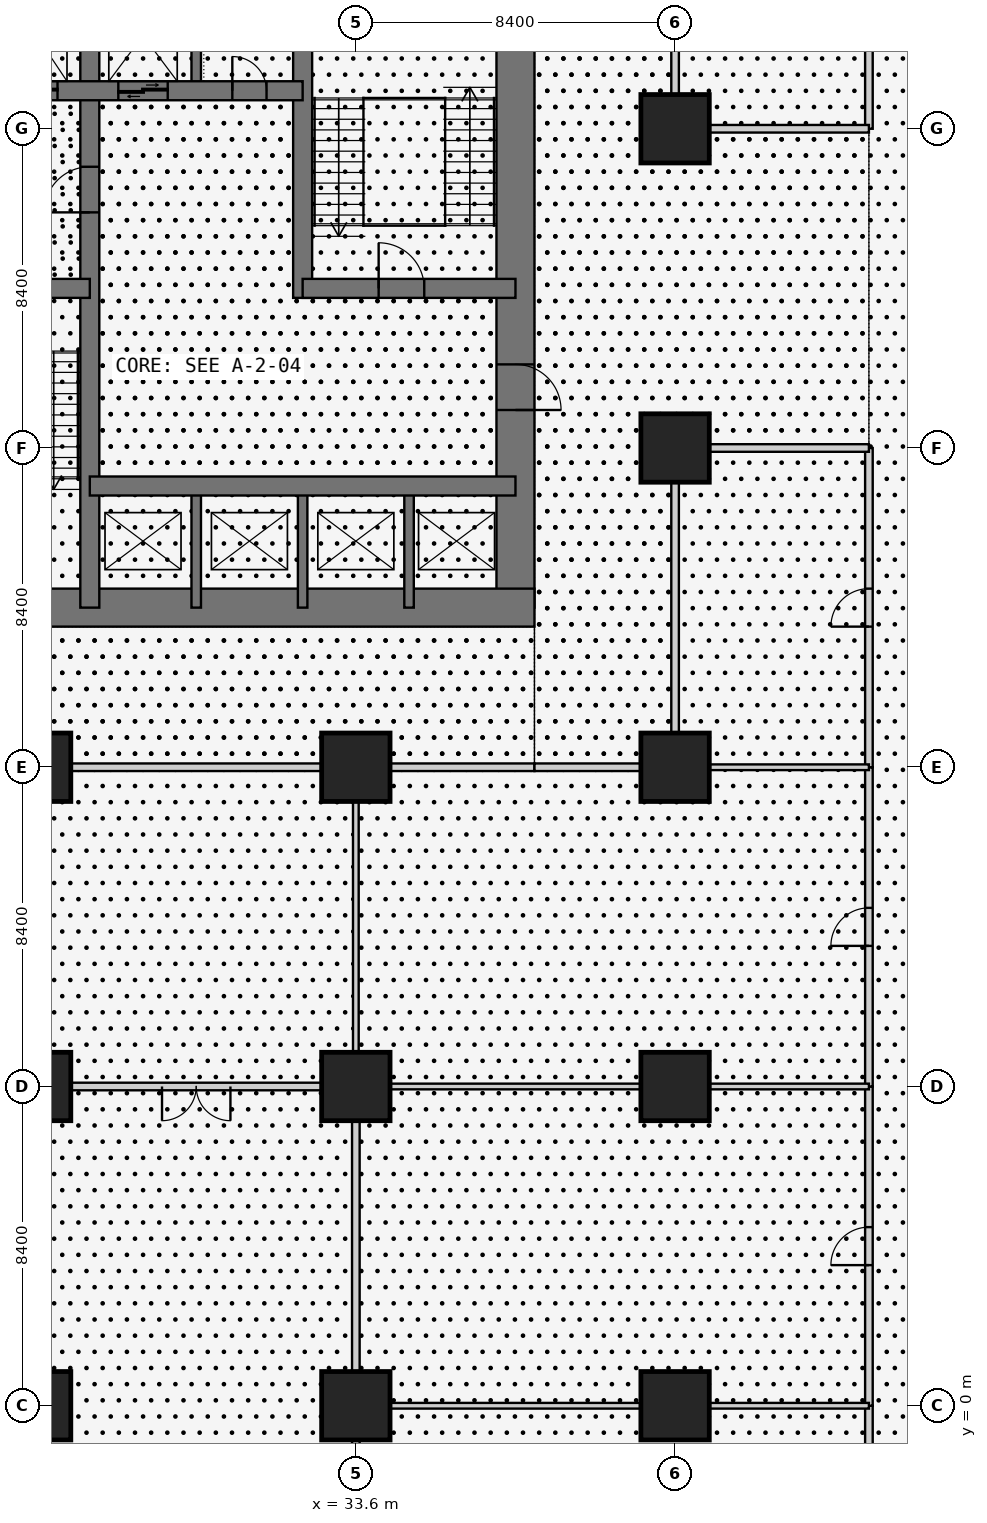
"""IFC4 building model, lengths in metres.
Left out: names, types, materials, properties, quantities, classifications, styles, units other than length and angle.
Written with IfcOpenShell. Run it as: python <this file> out.ifc"""

import sys

from ifc_helpers import new_model, si_unit, direction, frame, frame_2d, origin, origin_2d, place, context, subcontext, project, spatial, rectangle, extrude, element, fill, save


model = new_model("IFC4")
c1 = context("Model", 3, precision=1e-05, world=origin(), true_north=direction((0.0, 1.0)))
c2 = subcontext(c1, "Body", "Model", "MODEL_VIEW")
j1 = project(units=[si_unit("LENGTHUNIT", "METRE"), si_unit("PLANEANGLEUNIT", "RADIAN")], contexts=[c1])
p1 = place(None, origin())
s1 = spatial("IfcSite", under=j1, at=p1, CompositionType="ELEMENT")
p2 = place(p1, origin())
s2 = spatial("IfcBuilding", under=s1, at=p2, CompositionType="ELEMENT")
p3 = place(p2, frame((0.0, 0.0, 6.0)))
s3 = spatial("IfcBuildingStorey", under=s2, at=p3, CompositionType="ELEMENT", Elevation=6.0)
for number, where, z_axis, x_axis in (
    (1, (25.2, 0.0, 0.0), (0.0, 0.0, 1.0), (1.0, 0.0, 0.0)),
    (2, (25.2, 8.4, 0.0), (0.0, 0.0, 1.0), (1.0, 0.0, 0.0)),
    (3, (25.2, 16.8, 0.0), (0.0, 0.0, 1.0), (1.0, 0.0, 0.0)),
    (4, (33.6, 0.0, 0.0), (0.0, 0.0, 1.0), (1.0, 0.0, 0.0)),
    (5, (33.6, 8.4, 0.0), (0.0, 0.0, 1.0), (1.0, 0.0, 0.0)),
    (6, (33.6, 16.8, 0.0), (0.0, 0.0, 1.0), (1.0, 0.0, 0.0)),
    (7, (42.0, 0.0, 0.0), (0.0, 0.0, 1.0), (1.0, 0.0, 0.0)),
    (8, (42.0, 8.4, 0.0), (0.0, 0.0, 1.0), (1.0, 0.0, 0.0)),
    (9, (42.0, 16.8, 0.0), (0.0, 0.0, 1.0), (1.0, 0.0, 0.0)),
    (10, (42.0, 25.2, 0.0), (0.0, 0.0, 1.0), (1.0, 0.0, 0.0)),
    (11, (42.0, 33.6, 0.0), (0.0, 0.0, 1.0), (1.0, 0.0, 0.0)),
):
    element("IfcColumn", number, at=place(p3, frame(where, z_axis=z_axis, x_axis=x_axis)), inside=s3, PredefinedType="COLUMN", context=c2, shape_type="SweptSolid", body=[
        extrude(rectangle(XDim=1.8, YDim=1.8, at=origin_2d()), origin(), (0.0, 0.0, 1.0), 4.5),
    ])
p4 = place(p3, frame((21.0, 21.0, 0.0), z_axis=(0.0, 0.0, 1.0), x_axis=(1.0, 0.0, 0.0)))
e12 = element("IfcWall", 12, at=p4, inside=s3, PredefinedType="SHEAR", context=c2, shape_type="SweptSolid", body=[
    extrude(rectangle(XDim=17.3, YDim=1.0, at=frame_2d((8.65, 0.0))), origin(), (0.0, 0.0, 1.0), 4.5),
])
p5 = place(p3, frame((37.8, 21.0, 0.0), z_axis=(0.0, 0.0, 1.0), x_axis=(0.0, 1.0, 0.0)))
e13 = element("IfcWall", 13, at=p5, inside=s3, PredefinedType="SHEAR", context=c2, shape_type="SweptSolid", body=[
    extrude(rectangle(XDim=17.3, YDim=1.0, at=frame_2d((8.65, 0.0))), origin(), (0.0, 0.0, 1.0), 4.5),
])
p6 = place(p5, frame((5.2, 0.0, 0.0)))
e14 = element("IfcOpeningElement", 14, at=p6, cuts=e13, PredefinedType="OPENING", context=c2, shape_type="SweptSolid", body=[
    extrude(rectangle(XDim=1.2, YDim=2.1, at=frame_2d((0.6, 1.05))), frame((0.0, 0.51, 0.0), z_axis=(0.0, -1.0, 0.0), x_axis=(1.0, 0.0, 0.0)), (0.0, 0.0, 1.0), 1.02),
])
p7 = place(p3, frame((26.6, 21.0, 0.0), z_axis=(0.0, 0.0, 1.0), x_axis=(0.0, 1.0, 0.0)))
e15 = element("IfcWall", 15, at=p7, inside=s3, PredefinedType="SHEAR", context=c2, shape_type="SweptSolid", body=[
    extrude(rectangle(XDim=16.8, YDim=0.5, at=frame_2d((8.4, 0.0))), origin(), (0.0, 0.0, 1.0), 4.5),
])
p8 = place(p7, frame((10.4, 0.0, 0.0)))
e16 = element("IfcOpeningElement", 16, at=p8, cuts=e15, PredefinedType="OPENING", context=c2, shape_type="SweptSolid", body=[
    extrude(rectangle(XDim=1.2, YDim=2.1, at=frame_2d((0.6, 1.05))), frame((0.0, 0.26, 0.0), z_axis=(0.0, -1.0, 0.0), x_axis=(1.0, 0.0, 0.0)), (0.0, 0.0, 1.0), 0.52),
])
p9 = place(p3, frame((21.0, 29.4, 0.0), z_axis=(0.0, 0.0, 1.0), x_axis=(1.0, 0.0, 0.0)))
e17 = element("IfcWall", 17, at=p9, inside=s3, PredefinedType="SHEAR", context=c2, shape_type="SweptSolid", body=[
    extrude(rectangle(XDim=5.6, YDim=0.5, at=frame_2d((2.8, 0.0))), origin(), (0.0, 0.0, 1.0), 4.5),
])
p10 = place(p9, frame((2.3, 0.0, 0.0)))
e18 = element("IfcOpeningElement", 18, at=p10, cuts=e17, PredefinedType="OPENING", context=c2, shape_type="SweptSolid", body=[
    extrude(rectangle(XDim=1.2, YDim=2.1, at=frame_2d((0.6, 1.05))), frame((0.0, 0.26, 0.0), z_axis=(0.0, -1.0, 0.0), x_axis=(1.0, 0.0, 0.0)), (0.0, 0.0, 1.0), 0.52),
])
p11 = place(p3, frame((21.0, 34.6, 0.0), z_axis=(0.0, 0.0, 1.0), x_axis=(1.0, 0.0, 0.0)))
e19 = element("IfcWall", 19, at=p11, inside=s3, PredefinedType="SHEAR", context=c2, shape_type="SweptSolid", body=[
    extrude(rectangle(XDim=11.2, YDim=0.5, at=frame_2d((5.6, 0.0))), origin(), (0.0, 0.0, 1.0), 4.5),
])
p12 = place(p11, frame((9.35, 0.0, 0.0)))
e20 = element("IfcOpeningElement", 20, at=p12, cuts=e19, PredefinedType="OPENING", context=c2, shape_type="SweptSolid", body=[
    extrude(rectangle(XDim=0.9, YDim=2.1, at=frame_2d((0.45, 1.05))), frame((0.0, 0.26, 0.0), z_axis=(0.0, -1.0, 0.0), x_axis=(1.0, 0.0, 0.0)), (0.0, 0.0, 1.0), 0.52),
])
p13 = place(p11, frame((1.0, 0.0, 0.0)))
e21 = element("IfcOpeningElement", 21, at=p13, cuts=e19, PredefinedType="OPENING", context=c2, shape_type="SweptSolid", body=[
    extrude(rectangle(XDim=1.1, YDim=2.1, at=frame_2d((0.55, 1.05))), frame((0.0, 0.26, 0.0), z_axis=(0.0, -1.0, 0.0), x_axis=(1.0, 0.0, 0.0)), (0.0, 0.0, 1.0), 0.52),
])
p14 = place(p11, frame((3.65, 0.0, 0.0)))
e22 = element("IfcOpeningElement", 22, at=p14, cuts=e19, PredefinedType="OPENING", context=c2, shape_type="SweptSolid", body=[
    extrude(rectangle(XDim=1.1, YDim=2.1, at=frame_2d((0.55, 1.05))), frame((0.0, 0.26, 0.0), z_axis=(0.0, -1.0, 0.0), x_axis=(1.0, 0.0, 0.0)), (0.0, 0.0, 1.0), 0.52),
])
p15 = place(p11, frame((6.35, 0.0, 0.0)))
e23 = element("IfcOpeningElement", 23, at=p15, cuts=e19, PredefinedType="OPENING", context=c2, shape_type="SweptSolid", body=[
    extrude(rectangle(XDim=1.3, YDim=2.1, at=frame_2d((0.65, 1.05))), frame((0.0, 0.26, 0.0), z_axis=(0.0, -1.0, 0.0), x_axis=(1.0, 0.0, 0.0)), (0.0, 0.0, 1.0), 0.52),
])
p16 = place(p3, frame((26.6, 24.2, 0.0), z_axis=(0.0, 0.0, 1.0), x_axis=(1.0, 0.0, 0.0)))
e24 = element("IfcWall", 24, at=p16, inside=s3, PredefinedType="SHEAR", context=c2, shape_type="SweptSolid", body=[
    extrude(rectangle(XDim=11.2, YDim=0.5, at=frame_2d((5.6, 0.0))), origin(), (0.0, 0.0, 1.0), 4.5),
])
p17 = place(p3, frame((32.2, 29.15, 0.0), z_axis=(0.0, 0.0, 1.0), x_axis=(0.0, 1.0, 0.0)))
e25 = element("IfcWall", 25, at=p17, inside=s3, PredefinedType="SHEAR", context=c2, shape_type="SweptSolid", body=[
    extrude(rectangle(XDim=8.65, YDim=0.5, at=frame_2d((4.325, 0.0))), origin(), (0.0, 0.0, 1.0), 4.5),
])
p18 = place(p3, frame((32.2, 29.4, 0.0), z_axis=(0.0, 0.0, 1.0), x_axis=(1.0, 0.0, 0.0)))
e26 = element("IfcWall", 26, at=p18, inside=s3, PredefinedType="SHEAR", context=c2, shape_type="SweptSolid", body=[
    extrude(rectangle(XDim=5.6, YDim=0.5, at=frame_2d((2.8, 0.0))), origin(), (0.0, 0.0, 1.0), 4.5),
])
p19 = place(p18, frame((2.0, 0.0, 0.0)))
e27 = element("IfcOpeningElement", 27, at=p19, cuts=e26, PredefinedType="OPENING", context=c2, shape_type="SweptSolid", body=[
    extrude(rectangle(XDim=1.2, YDim=2.1, at=frame_2d((0.6, 1.05))), frame((0.0, 0.26, 0.0), z_axis=(0.0, -1.0, 0.0), x_axis=(1.0, 0.0, 0.0)), (0.0, 0.0, 1.0), 0.52),
])
for number, where, z_axis, x_axis in (
    (28, (29.4, 21.0, 0.0), (0.0, 0.0, 1.0), (0.0, 1.0, 0.0)),
    (29, (32.2, 21.0, 0.0), (0.0, 0.0, 1.0), (0.0, 1.0, 0.0)),
    (30, (35.0, 21.0, 0.0), (0.0, 0.0, 1.0), (0.0, 1.0, 0.0)),
    (31, (29.4, 34.6, 0.0), (0.0, 0.0, 1.0), (0.0, 1.0, 0.0)),
):
    element("IfcWall", number, at=place(p3, frame(where, z_axis=z_axis, x_axis=x_axis)), inside=s3, PredefinedType="SHEAR", context=c2, shape_type="SweptSolid", body=[
        extrude(rectangle(XDim=3.2, YDim=0.25, at=frame_2d((1.6, 0.0))), origin(), (0.0, 0.0, 1.0), 4.5),
    ])
p20 = place(p3, frame((33.6, -0.9, 0.0), z_axis=(0.0, 0.0, 1.0), x_axis=(0.0, -1.0, 0.0)))
e32 = element("IfcWall", 32, at=p20, inside=s3, PredefinedType="PARTITIONING", context=c2, shape_type="SweptSolid", body=[
    extrude(rectangle(XDim=4.2, YDim=0.2, at=frame_2d((2.1, 0.0))), origin(), (0.0, 0.0, 1.0), 3.543),
])
p21 = place(p3, frame((47.1, -5.1, 0.0), z_axis=(0.0, 0.0, 1.0), x_axis=(0.0, 1.0, 0.0)))
e33 = element("IfcWall", 33, at=p21, inside=s3, PredefinedType="PARTITIONING", context=c2, shape_type="SweptSolid", body=[
    extrude(rectangle(XDim=5.1, YDim=0.2, at=frame_2d((2.55, 0.0))), origin(), (0.0, 0.0, 1.0), 4.3),
])
p22 = place(p3, frame((33.6, 7.5, 0.0), z_axis=(0.0, 0.0, 1.0), x_axis=(0.0, -1.0, 0.0)))
e34 = element("IfcWall", 34, at=p22, inside=s3, PredefinedType="PARTITIONING", context=c2, shape_type="SweptSolid", body=[
    extrude(rectangle(XDim=6.6, YDim=0.2, at=frame_2d((3.3, 0.0))), origin(), (0.0, 0.0, 1.0), 3.543),
])
p23 = place(p3, frame((47.1, 0.0, 0.0), z_axis=(0.0, 0.0, 1.0), x_axis=(0.0, 1.0, 0.0)))
e35 = element("IfcWall", 35, at=p23, inside=s3, PredefinedType="PARTITIONING", context=c2, shape_type="SweptSolid", body=[
    extrude(rectangle(XDim=8.4, YDim=0.2, at=frame_2d((4.2, 0.0))), origin(), (0.0, 0.0, 1.0), 4.3),
])
p24 = place(p23, frame((3.7, 0.0, 0.0)))
e36 = element("IfcOpeningElement", 36, at=p24, cuts=e35, PredefinedType="OPENING", context=c2, shape_type="SweptSolid", body=[
    extrude(rectangle(XDim=1.0, YDim=2.1, at=frame_2d((0.5, 1.05))), frame((0.0, 0.11, 0.0), z_axis=(0.0, -1.0, 0.0), x_axis=(1.0, 0.0, 0.0)), (0.0, 0.0, 1.0), 0.22),
])
p25 = place(p3, frame((26.1, 8.4, 0.0), z_axis=(0.0, 0.0, 1.0), x_axis=(1.0, 0.0, 0.0)))
e37 = element("IfcWall", 37, at=p25, inside=s3, PredefinedType="PARTITIONING", context=c2, shape_type="SweptSolid", body=[
    extrude(rectangle(XDim=6.6, YDim=0.2, at=frame_2d((3.3, 0.0))), origin(), (0.0, 0.0, 1.0), 3.543),
])
p26 = place(p25, frame((2.4, 0.0, 0.0)))
e38 = element("IfcOpeningElement", 38, at=p26, cuts=e37, PredefinedType="OPENING", context=c2, shape_type="SweptSolid", body=[
    extrude(rectangle(XDim=1.8, YDim=2.4, at=frame_2d((0.9, 1.2))), frame((0.0, 0.11, 0.0), z_axis=(0.0, -1.0, 0.0), x_axis=(1.0, 0.0, 0.0)), (0.0, 0.0, 1.0), 0.22),
])
p27 = place(p3, frame((47.1, 8.4, 0.0), z_axis=(0.0, 0.0, 1.0), x_axis=(0.0, 1.0, 0.0)))
e39 = element("IfcWall", 39, at=p27, inside=s3, PredefinedType="PARTITIONING", context=c2, shape_type="SweptSolid", body=[
    extrude(rectangle(XDim=8.4, YDim=0.2, at=frame_2d((4.2, 0.0))), origin(), (0.0, 0.0, 1.0), 4.3),
])
p28 = place(p27, frame((3.7, 0.0, 0.0)))
e40 = element("IfcOpeningElement", 40, at=p28, cuts=e39, PredefinedType="OPENING", context=c2, shape_type="SweptSolid", body=[
    extrude(rectangle(XDim=1.0, YDim=2.1, at=frame_2d((0.5, 1.05))), frame((0.0, 0.11, 0.0), z_axis=(0.0, -1.0, 0.0), x_axis=(1.0, 0.0, 0.0)), (0.0, 0.0, 1.0), 0.22),
])
p29 = place(p3, frame((47.1, 16.8, 0.0), z_axis=(0.0, 0.0, 1.0), x_axis=(0.0, 1.0, 0.0)))
e41 = element("IfcWall", 41, at=p29, inside=s3, PredefinedType="PARTITIONING", context=c2, shape_type="SweptSolid", body=[
    extrude(rectangle(XDim=8.4, YDim=0.2, at=frame_2d((4.2, 0.0))), origin(), (0.0, 0.0, 1.0), 4.3),
])
p30 = place(p29, frame((3.7, 0.0, 0.0)))
e42 = element("IfcOpeningElement", 42, at=p30, cuts=e41, PredefinedType="OPENING", context=c2, shape_type="SweptSolid", body=[
    extrude(rectangle(XDim=1.0, YDim=2.1, at=frame_2d((0.5, 1.05))), frame((0.0, 0.11, 0.0), z_axis=(0.0, -1.0, 0.0), x_axis=(1.0, 0.0, 0.0)), (0.0, 0.0, 1.0), 0.22),
])
p31 = place(p3, frame((47.1, 33.6, 0.0), z_axis=(0.0, 0.0, 1.0), x_axis=(0.0, 1.0, 0.0)))
e43 = element("IfcWall", 43, at=p31, inside=s3, PredefinedType="PARTITIONING", context=c2, shape_type="SweptSolid", body=[
    extrude(rectangle(XDim=8.4, YDim=0.2, at=frame_2d((4.2, 0.0))), origin(), (0.0, 0.0, 1.0), 4.3),
])
p32 = place(p31, frame((3.7, 0.0, 0.0)))
e44 = element("IfcOpeningElement", 44, at=p32, cuts=e43, PredefinedType="OPENING", context=c2, shape_type="SweptSolid", body=[
    extrude(rectangle(XDim=1.0, YDim=2.1, at=frame_2d((0.5, 1.05))), frame((0.0, 0.11, 0.0), z_axis=(0.0, -1.0, 0.0), x_axis=(1.0, 0.0, 0.0)), (0.0, 0.0, 1.0), 0.22),
])
p33 = place(p3, frame((32.7, 16.8, 0.0), z_axis=(0.0, 0.0, 1.0), x_axis=(-1.0, 0.0, 0.0)))
e45 = element("IfcWall", 45, at=p33, inside=s3, PredefinedType="PARTITIONING", context=c2, shape_type="SweptSolid", body=[
    extrude(rectangle(XDim=6.6, YDim=0.2, at=frame_2d((3.3, 0.0))), origin(), (0.0, 0.0, 1.0), 3.543),
])
p34 = place(p3, frame((38.3, 16.8, 0.0), z_axis=(0.0, 0.0, 1.0), x_axis=(-1.0, 0.0, 0.0)))
e46 = element("IfcWall", 46, at=p34, inside=s3, PredefinedType="PARTITIONING", context=c2, shape_type="SweptSolid", body=[
    extrude(rectangle(XDim=3.8, YDim=0.2, at=frame_2d((1.9, 0.0))), origin(), (0.0, 0.0, 1.0), 3.543),
])
p35 = place(p3, frame((41.1, 16.8, 0.0), z_axis=(0.0, 0.0, 1.0), x_axis=(-1.0, 0.0, 0.0)))
e47 = element("IfcWall", 47, at=p35, inside=s3, PredefinedType="PARTITIONING", context=c2, shape_type="SweptSolid", body=[
    extrude(rectangle(XDim=2.8, YDim=0.2, at=frame_2d((1.4, 0.0))), origin(), (0.0, 0.0, 1.0), 3.543),
])
p36 = place(p3, frame((42.0, 24.3, 0.0), z_axis=(0.0, 0.0, 1.0), x_axis=(0.0, -1.0, 0.0)))
e48 = element("IfcWall", 48, at=p36, inside=s3, PredefinedType="PARTITIONING", context=c2, shape_type="SweptSolid", body=[
    extrude(rectangle(XDim=6.6, YDim=0.2, at=frame_2d((3.3, 0.0))), origin(), (0.0, 0.0, 1.0), 3.543),
])
p37 = place(p3, frame((47.1, 25.2, 0.0), z_axis=(0.0, 0.0, 1.0), x_axis=(-1.0, 0.0, 0.0)))
e49 = element("IfcWall", 49, at=p37, inside=s3, PredefinedType="PARTITIONING", context=c2, shape_type="SweptSolid", body=[
    extrude(rectangle(XDim=4.2, YDim=0.2, at=frame_2d((2.1, 0.0))), origin(), (0.0, 0.0, 1.0), 3.543),
])
p38 = place(p3, frame((42.0, 41.1, 0.0), z_axis=(0.0, 0.0, 1.0), x_axis=(0.0, -1.0, 0.0)))
e50 = element("IfcWall", 50, at=p38, inside=s3, PredefinedType="PARTITIONING", context=c2, shape_type="SweptSolid", body=[
    extrude(rectangle(XDim=6.6, YDim=0.2, at=frame_2d((3.3, 0.0))), origin(), (0.0, 0.0, 1.0), 3.543),
])
p39 = place(p3, frame((42.9, 33.6, 0.0), z_axis=(0.0, 0.0, 1.0), x_axis=(1.0, 0.0, 0.0)))
e51 = element("IfcWall", 51, at=p39, inside=s3, PredefinedType="PARTITIONING", context=c2, shape_type="SweptSolid", body=[
    extrude(rectangle(XDim=4.2, YDim=0.2, at=frame_2d((2.1, 0.0))), origin(), (0.0, 0.0, 1.0), 3.543),
])
p40 = place(p3, frame((34.5, 0.0, 0.0), z_axis=(0.0, 0.0, 1.0), x_axis=(1.0, 0.0, 0.0)))
e52 = element("IfcWall", 52, at=p40, inside=s3, PredefinedType="PARTITIONING", context=c2, shape_type="SweptSolid", body=[
    extrude(rectangle(XDim=6.6, YDim=0.15, at=frame_2d((3.3, 0.0))), origin(), (0.0, 0.0, 1.0), 3.543),
])
p41 = place(p3, frame((42.9, 0.0, 0.0), z_axis=(0.0, 0.0, 1.0), x_axis=(1.0, 0.0, 0.0)))
e53 = element("IfcWall", 53, at=p41, inside=s3, PredefinedType="PARTITIONING", context=c2, shape_type="SweptSolid", body=[
    extrude(rectangle(XDim=4.2, YDim=0.15, at=frame_2d((2.1, 0.0))), origin(), (0.0, 0.0, 1.0), 3.543),
])
p42 = place(p3, frame((34.5, 8.4, 0.0), z_axis=(0.0, 0.0, 1.0), x_axis=(1.0, 0.0, 0.0)))
e54 = element("IfcWall", 54, at=p42, inside=s3, PredefinedType="PARTITIONING", context=c2, shape_type="SweptSolid", body=[
    extrude(rectangle(XDim=6.6, YDim=0.15, at=frame_2d((3.3, 0.0))), origin(), (0.0, 0.0, 1.0), 3.543),
])
p43 = place(p3, frame((42.9, 8.4, 0.0), z_axis=(0.0, 0.0, 1.0), x_axis=(1.0, 0.0, 0.0)))
e55 = element("IfcWall", 55, at=p43, inside=s3, PredefinedType="PARTITIONING", context=c2, shape_type="SweptSolid", body=[
    extrude(rectangle(XDim=4.2, YDim=0.15, at=frame_2d((2.1, 0.0))), origin(), (0.0, 0.0, 1.0), 3.543),
])
p44 = place(p3, frame((33.6, 15.9, 0.0), z_axis=(0.0, 0.0, 1.0), x_axis=(0.0, -1.0, 0.0)))
e56 = element("IfcWall", 56, at=p44, inside=s3, PredefinedType="PARTITIONING", context=c2, shape_type="SweptSolid", body=[
    extrude(rectangle(XDim=6.6, YDim=0.15, at=frame_2d((3.3, 0.0))), origin(), (0.0, 0.0, 1.0), 3.543),
])
p45 = place(p3, frame((42.9, 16.8, 0.0), z_axis=(0.0, 0.0, 1.0), x_axis=(1.0, 0.0, 0.0)))
e57 = element("IfcWall", 57, at=p45, inside=s3, PredefinedType="PARTITIONING", context=c2, shape_type="SweptSolid", body=[
    extrude(rectangle(XDim=4.2, YDim=0.15, at=frame_2d((2.1, 0.0))), origin(), (0.0, 0.0, 1.0), 3.543),
])
p46 = place(p24, origin())
e58 = element("IfcDoor", 58, at=p46, inside=s3, OperationType="SINGLE_SWING_LEFT", PredefinedType="DOOR", context=c2, shape_type="SweptSolid", body=[
    extrude(rectangle(XDim=1.0, YDim=2.1, at=frame_2d((0.5, 1.05))), frame((0.0, 0.025, 0.0), z_axis=(0.0, -1.0, 0.0), x_axis=(1.0, 0.0, 0.0)), (0.0, 0.0, 1.0), 0.05),
])
fill(e36, e58)
p47 = place(p26, frame((1.8, 0.0, 0.0), z_axis=(0.0, 0.0, 1.0), x_axis=(-1.0, 0.0, 0.0)))
e59 = element("IfcDoor", 59, at=p47, inside=s3, OperationType="DOUBLE_DOOR_SINGLE_SWING", PredefinedType="DOOR", context=c2, shape_type="SweptSolid", body=[
    extrude(rectangle(XDim=1.8, YDim=2.4, at=frame_2d((0.9, 1.2))), frame((0.0, 0.025, 0.0), z_axis=(0.0, -1.0, 0.0), x_axis=(1.0, 0.0, 0.0)), (0.0, 0.0, 1.0), 0.05),
])
fill(e38, e59)
p48 = place(p28, origin())
e60 = element("IfcDoor", 60, at=p48, inside=s3, OperationType="SINGLE_SWING_LEFT", PredefinedType="DOOR", context=c2, shape_type="SweptSolid", body=[
    extrude(rectangle(XDim=1.0, YDim=2.1, at=frame_2d((0.5, 1.05))), frame((0.0, 0.025, 0.0), z_axis=(0.0, -1.0, 0.0), x_axis=(1.0, 0.0, 0.0)), (0.0, 0.0, 1.0), 0.05),
])
fill(e40, e60)
p49 = place(p30, origin())
e61 = element("IfcDoor", 61, at=p49, inside=s3, OperationType="SINGLE_SWING_LEFT", PredefinedType="DOOR", context=c2, shape_type="SweptSolid", body=[
    extrude(rectangle(XDim=1.0, YDim=2.1, at=frame_2d((0.5, 1.05))), frame((0.0, 0.025, 0.0), z_axis=(0.0, -1.0, 0.0), x_axis=(1.0, 0.0, 0.0)), (0.0, 0.0, 1.0), 0.05),
])
fill(e42, e61)
p50 = place(p8, origin())
e62 = element("IfcDoor", 62, at=p50, inside=s3, OperationType="SINGLE_SWING_LEFT", PredefinedType="DOOR", context=c2, shape_type="SweptSolid", body=[
    extrude(rectangle(XDim=1.2, YDim=2.1, at=frame_2d((0.6, 1.05))), frame((0.0, 0.025, 0.0), z_axis=(0.0, -1.0, 0.0), x_axis=(1.0, 0.0, 0.0)), (0.0, 0.0, 1.0), 0.05),
])
fill(e16, e62)
p51 = place(p6, frame((1.2, 0.0, 0.0), z_axis=(0.0, 0.0, 1.0), x_axis=(-1.0, 0.0, 0.0)))
e63 = element("IfcDoor", 63, at=p51, inside=s3, OperationType="SINGLE_SWING_RIGHT", PredefinedType="DOOR", context=c2, shape_type="SweptSolid", body=[
    extrude(rectangle(XDim=1.2, YDim=2.1, at=frame_2d((0.6, 1.05))), frame((0.0, 0.025, 0.0), z_axis=(0.0, -1.0, 0.0), x_axis=(1.0, 0.0, 0.0)), (0.0, 0.0, 1.0), 0.05),
])
fill(e14, e63)
p52 = place(p19, origin())
e64 = element("IfcDoor", 64, at=p52, inside=s3, OperationType="SINGLE_SWING_LEFT", PredefinedType="DOOR", context=c2, shape_type="SweptSolid", body=[
    extrude(rectangle(XDim=1.2, YDim=2.1, at=frame_2d((0.6, 1.05))), frame((0.0, 0.025, 0.0), z_axis=(0.0, -1.0, 0.0), x_axis=(1.0, 0.0, 0.0)), (0.0, 0.0, 1.0), 0.05),
])
fill(e27, e64)
p53 = place(p12, origin())
e65 = element("IfcDoor", 65, at=p53, inside=s3, OperationType="SINGLE_SWING_LEFT", PredefinedType="DOOR", context=c2, shape_type="SweptSolid", body=[
    extrude(rectangle(XDim=0.9, YDim=2.1, at=frame_2d((0.45, 1.05))), frame((0.0, 0.025, 0.0), z_axis=(0.0, -1.0, 0.0), x_axis=(1.0, 0.0, 0.0)), (0.0, 0.0, 1.0), 0.05),
])
fill(e20, e65)
p54 = place(p14, origin())
e66 = element("IfcDoor", 66, at=p54, inside=s3, OperationType="DOUBLE_DOOR_SLIDING", PredefinedType="DOOR", context=c2, shape_type="SweptSolid", body=[
    extrude(rectangle(XDim=1.1, YDim=2.1, at=frame_2d((0.55, 1.05))), frame((0.0, 0.025, 0.0), z_axis=(0.0, -1.0, 0.0), x_axis=(1.0, 0.0, 0.0)), (0.0, 0.0, 1.0), 0.05),
])
fill(e22, e66)
p55 = place(p15, origin())
e67 = element("IfcDoor", 67, at=p55, inside=s3, OperationType="DOUBLE_DOOR_SLIDING", PredefinedType="DOOR", context=c2, shape_type="SweptSolid", body=[
    extrude(rectangle(XDim=1.3, YDim=2.1, at=frame_2d((0.65, 1.05))), frame((0.0, 0.025, 0.0), z_axis=(0.0, -1.0, 0.0), x_axis=(1.0, 0.0, 0.0)), (0.0, 0.0, 1.0), 0.05),
])
fill(e23, e67)
save(model, sys.argv[1])
